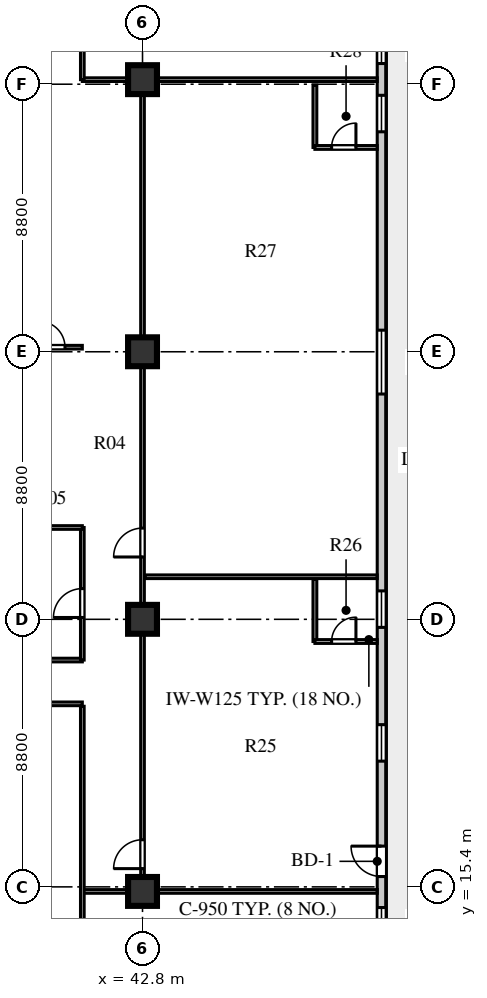
"""IFC4 building model, lengths in metres.
Left out: names, types, materials, properties, quantities, classifications, styles, units other than length and angle.
Written with IfcOpenShell. Run it as: python <this file> out.ifc"""

import sys

from ifc_helpers import new_model, si_unit, direction, frame, frame_2d, origin, origin_2d, place, context, subcontext, project, spatial, rectangle, extrude, element, fill, save


model = new_model("IFC4")
c1 = context("Model", 3, precision=1e-05, world=origin(), true_north=direction((0.0, 1.0)))
c2 = subcontext(c1, "Body", "Model", "MODEL_VIEW")
j1 = project(units=[si_unit("LENGTHUNIT", "METRE"), si_unit("PLANEANGLEUNIT", "RADIAN")], contexts=[c1])
p1 = place(None, origin())
s1 = spatial("IfcSite", under=j1, at=p1, CompositionType="ELEMENT")
p2 = place(p1, origin())
s2 = spatial("IfcBuilding", under=s1, at=p2, CompositionType="ELEMENT")
p3 = place(p2, frame((0.0, 0.0, 181.0)))
s3 = spatial("IfcBuildingStorey", under=s2, at=p3, CompositionType="ELEMENT", Elevation=181.0)
for number, where, z_axis, x_axis in (
    (1, (42.8, 15.25, 0.0), (0.0, 0.0, 1.0), (1.0, 0.0, 0.0)),
    (2, (42.8, 24.2, 0.0), (0.0, 0.0, 1.0), (1.0, 0.0, 0.0)),
    (3, (42.8, 33.0, 0.0), (0.0, 0.0, 1.0), (1.0, 0.0, 0.0)),
    (4, (42.8, 41.95, 0.0), (0.0, 0.0, 1.0), (1.0, 0.0, 0.0)),
):
    element("IfcColumn", number, at=place(p3, frame(where, z_axis=z_axis, x_axis=x_axis)), inside=s3, PredefinedType="COLUMN", context=c2, shape_type="SweptSolid", body=[
        extrude(rectangle(XDim=0.95, YDim=0.95, at=origin_2d()), origin(), (0.0, 0.0, 1.0), 3.6),
    ])
p4 = place(p3, frame((50.66, 13.13, 0.0), z_axis=(0.0, 0.0, 1.0), x_axis=(0.0, 1.0, 0.0)))
e5 = element("IfcWall", 5, at=p4, inside=s3, PredefinedType="STANDARD", context=c2, shape_type="SweptSolid", body=[
    extrude(rectangle(XDim=30.94, YDim=0.28, at=frame_2d((15.47, 0.0))), origin(), (0.0, 0.0, 1.0), 3.6),
])
p5 = place(p4, frame((0.64, 0.0, 0.8)))
e6 = element("IfcOpeningElement", 6, at=p5, cuts=e5, PredefinedType="OPENING", context=c2, shape_type="SweptSolid", body=[
    extrude(rectangle(XDim=0.95, YDim=1.65, at=frame_2d((0.475, 0.825))), frame((0.0, 0.15, 0.0), z_axis=(0.0, -1.0, 0.0), x_axis=(1.0, 0.0, 0.0)), (0.0, 0.0, 1.0), 0.3),
])
p6 = place(p4, frame((2.61, 0.0, 0.0)))
e7 = element("IfcOpeningElement", 7, at=p6, cuts=e5, PredefinedType="OPENING", context=c2, shape_type="SweptSolid", body=[
    extrude(rectangle(XDim=1.0, YDim=2.05, at=frame_2d((0.5, 1.025))), frame((0.0, 0.15, 0.0), z_axis=(0.0, -1.0, 0.0), x_axis=(1.0, 0.0, 0.0)), (0.0, 0.0, 1.0), 0.3),
])
p7 = place(p4, frame((6.405, 0.0, 0.8)))
e8 = element("IfcOpeningElement", 8, at=p7, cuts=e5, PredefinedType="OPENING", context=c2, shape_type="SweptSolid", body=[
    extrude(rectangle(XDim=1.2, YDim=1.75, at=frame_2d((0.6, 0.875))), frame((0.0, 0.15, 0.0), z_axis=(0.0, -1.0, 0.0), x_axis=(1.0, 0.0, 0.0)), (0.0, 0.0, 1.0), 0.3),
])
p8 = place(p4, frame((10.805, 0.0, 0.8)))
e9 = element("IfcOpeningElement", 9, at=p8, cuts=e5, PredefinedType="OPENING", context=c2, shape_type="SweptSolid", body=[
    extrude(rectangle(XDim=1.2, YDim=1.75, at=frame_2d((0.6, 0.875))), frame((0.0, 0.15, 0.0), z_axis=(0.0, -1.0, 0.0), x_axis=(1.0, 0.0, 0.0)), (0.0, 0.0, 1.0), 0.3),
])
p9 = place(p4, frame((18.48, 0.0, 0.8)))
e10 = element("IfcOpeningElement", 10, at=p9, cuts=e5, PredefinedType="OPENING", context=c2, shape_type="SweptSolid", body=[
    extrude(rectangle(XDim=2.1, YDim=1.95, at=frame_2d((1.05, 0.975))), frame((0.0, 0.15, 0.0), z_axis=(0.0, -1.0, 0.0), x_axis=(1.0, 0.0, 0.0)), (0.0, 0.0, 1.0), 0.3),
])
p10 = place(p4, frame((27.105, 0.0, 0.8)))
e11 = element("IfcOpeningElement", 11, at=p10, cuts=e5, PredefinedType="OPENING", context=c2, shape_type="SweptSolid", body=[
    extrude(rectangle(XDim=1.2, YDim=1.75, at=frame_2d((0.6, 0.875))), frame((0.0, 0.15, 0.0), z_axis=(0.0, -1.0, 0.0), x_axis=(1.0, 0.0, 0.0)), (0.0, 0.0, 1.0), 0.3),
])
p11 = place(p4, frame((29.35, 0.0, 0.8)))
e12 = element("IfcOpeningElement", 12, at=p11, cuts=e5, PredefinedType="OPENING", context=c2, shape_type="SweptSolid", body=[
    extrude(rectangle(XDim=0.95, YDim=1.65, at=frame_2d((0.475, 0.825))), frame((0.0, 0.15, 0.0), z_axis=(0.0, -1.0, 0.0), x_axis=(1.0, 0.0, 0.0)), (0.0, 0.0, 1.0), 0.3),
])
p12 = place(p3, frame((25.22, 21.42, 0.0), z_axis=(0.0, 0.0, 1.0), x_axis=(1.0, 0.0, 0.0)))
e13 = element("IfcWall", 13, at=p12, inside=s3, PredefinedType="PARTITIONING", context=c2, shape_type="SweptSolid", body=[
    extrude(rectangle(XDim=15.6, YDim=0.12, at=frame_2d((7.8, 0.0))), origin(), (0.0, 0.0, 1.0), 3.25),
])
p13 = place(p12, frame((0.73, 0.0, 0.0)))
e14 = element("IfcOpeningElement", 14, at=p13, cuts=e13, PredefinedType="OPENING", context=c2, shape_type="SweptSolid", body=[
    extrude(rectangle(XDim=0.95, YDim=2.1, at=frame_2d((0.475, 1.05))), frame((0.0, 0.07, 0.0), z_axis=(0.0, -1.0, 0.0), x_axis=(1.0, 0.0, 0.0)), (0.0, 0.0, 1.0), 0.14),
])
p14 = place(p12, frame((4.83, 0.0, 0.0)))
e15 = element("IfcOpeningElement", 15, at=p14, cuts=e13, PredefinedType="OPENING", context=c2, shape_type="SweptSolid", body=[
    extrude(rectangle(XDim=0.95, YDim=2.1, at=frame_2d((0.475, 1.05))), frame((0.0, 0.07, 0.0), z_axis=(0.0, -1.0, 0.0), x_axis=(1.0, 0.0, 0.0)), (0.0, 0.0, 1.0), 0.14),
])
p15 = place(p12, frame((10.23, 0.0, 0.0)))
e16 = element("IfcOpeningElement", 16, at=p15, cuts=e13, PredefinedType="OPENING", context=c2, shape_type="SweptSolid", body=[
    extrude(rectangle(XDim=0.95, YDim=2.1, at=frame_2d((0.475, 1.05))), frame((0.0, 0.07, 0.0), z_axis=(0.0, -1.0, 0.0), x_axis=(1.0, 0.0, 0.0)), (0.0, 0.0, 1.0), 0.14),
])
p16 = place(p3, frame((27.15, 22.86, 0.0), z_axis=(0.0, 0.0, 1.0), x_axis=(1.0, 0.0, 0.0)))
e17 = element("IfcWall", 17, at=p16, inside=s3, PredefinedType="PARTITIONING", context=c2, shape_type="SweptSolid", body=[
    extrude(rectangle(XDim=13.67, YDim=0.12, at=frame_2d((6.835, 0.0))), origin(), (0.0, 0.0, 1.0), 3.6),
])
p17 = place(p16, frame((2.2, 0.0, 0.0)))
e18 = element("IfcOpeningElement", 18, at=p17, cuts=e17, PredefinedType="OPENING", context=c2, shape_type="SweptSolid", body=[
    extrude(rectangle(XDim=0.9, YDim=2.08, at=frame_2d((0.45, 1.04))), frame((0.0, 0.07, 0.0), z_axis=(0.0, -1.0, 0.0), x_axis=(1.0, 0.0, 0.0)), (0.0, 0.0, 1.0), 0.14),
])
p18 = place(p3, frame((42.8, 15.25, 0.0), z_axis=(0.0, 0.0, 1.0), x_axis=(0.0, 1.0, 0.0)))
e19 = element("IfcWall", 19, at=p18, inside=s3, PredefinedType="PARTITIONING", context=c2, shape_type="SweptSolid", body=[
    extrude(rectangle(XDim=26.7, YDim=0.12, at=frame_2d((13.35, 0.0))), origin(), (0.0, 0.0, 1.0), 2.95),
])
p19 = place(p18, frame((0.75, 0.0, 0.0)))
e20 = element("IfcOpeningElement", 20, at=p19, cuts=e19, PredefinedType="OPENING", context=c2, shape_type="SweptSolid", body=[
    extrude(rectangle(XDim=0.95, YDim=2.1, at=frame_2d((0.475, 1.05))), frame((0.0, 0.07, 0.0), z_axis=(0.0, -1.0, 0.0), x_axis=(1.0, 0.0, 0.0)), (0.0, 0.0, 1.0), 0.14),
])
p20 = place(p18, frame((11.0, 0.0, 0.0)))
e21 = element("IfcOpeningElement", 21, at=p20, cuts=e19, PredefinedType="OPENING", context=c2, shape_type="SweptSolid", body=[
    extrude(rectangle(XDim=0.95, YDim=2.1, at=frame_2d((0.475, 1.05))), frame((0.0, 0.07, 0.0), z_axis=(0.0, -1.0, 0.0), x_axis=(1.0, 0.0, 0.0)), (0.0, 0.0, 1.0), 0.14),
])
for number, where, z_axis, x_axis in (
    (22, (40.82, 15.25, 0.0), (0.0, 0.0, 1.0), (1.0, 0.0, 0.0)),
    (23, (40.82, 41.95, 0.0), (0.0, 0.0, 1.0), (1.0, 0.0, 0.0)),
):
    element("IfcWall", number, at=place(p3, frame(where, z_axis=z_axis, x_axis=x_axis)), inside=s3, PredefinedType="PARTITIONING", context=c2, shape_type="SweptSolid", body=[
        extrude(rectangle(XDim=9.7, YDim=0.12, at=frame_2d((4.85, 0.0))), origin(), (0.0, 0.0, 1.0), 2.95),
    ])
p21 = place(p3, frame((40.82, 22.86, 0.0), z_axis=(0.0, 0.0, 1.0), x_axis=(0.0, 1.0, 0.0)))
e24 = element("IfcWall", 24, at=p21, inside=s3, PredefinedType="PARTITIONING", context=c2, shape_type="SweptSolid", body=[
    extrude(rectangle(XDim=4.36, YDim=0.12, at=frame_2d((2.18, 0.0))), origin(), (0.0, 0.0, 1.0), 3.6),
])
p22 = place(p21, frame((1.4, 0.0, 0.0)))
e25 = element("IfcOpeningElement", 25, at=p22, cuts=e24, PredefinedType="OPENING", context=c2, shape_type="SweptSolid", body=[
    extrude(rectangle(XDim=0.95, YDim=2.1, at=frame_2d((0.475, 1.05))), frame((0.0, 0.07, 0.0), z_axis=(0.0, -1.0, 0.0), x_axis=(1.0, 0.0, 0.0)), (0.0, 0.0, 1.0), 0.14),
])
p23 = place(p3, frame((36.9, 27.22, 0.0), z_axis=(0.0, 0.0, 1.0), x_axis=(1.0, 0.0, 0.0)))
e26 = element("IfcWall", 26, at=p23, inside=s3, PredefinedType="PARTITIONING", context=c2, shape_type="SweptSolid", body=[
    extrude(rectangle(XDim=3.92, YDim=0.12, at=frame_2d((1.96, 0.0))), origin(), (0.0, 0.0, 1.0), 3.25),
])
p24 = place(p3, frame((40.82, 7.88, 0.0), z_axis=(0.0, 0.0, 1.0), x_axis=(0.0, 1.0, 0.0)))
e27 = element("IfcWall", 27, at=p24, inside=s3, PredefinedType="PARTITIONING", context=c2, shape_type="SweptSolid", body=[
    extrude(rectangle(XDim=13.46, YDim=0.12, at=frame_2d((6.73, 0.0))), origin(), (0.0, 0.0, 1.0), 3.6),
])
p25 = place(p3, frame((48.47, 23.47, 0.0), z_axis=(0.0, 0.0, 1.0), x_axis=(0.0, 1.0, 0.0)))
e28 = element("IfcWall", 28, at=p25, inside=s3, PredefinedType="PLUMBINGWALL", context=c2, shape_type="SweptSolid", body=[
    extrude(rectangle(XDim=2.05, YDim=0.125, at=frame_2d((1.025, 0.0))), origin(), (0.0, 0.0, 1.0), 3.6),
])
p26 = place(p3, frame((48.47, 23.47, 0.0), z_axis=(0.0, 0.0, 1.0), x_axis=(1.0, 0.0, 0.0)))
e29 = element("IfcWall", 29, at=p26, inside=s3, PredefinedType="PLUMBINGWALL", context=c2, shape_type="SweptSolid", body=[
    extrude(rectangle(XDim=2.05, YDim=0.125, at=frame_2d((1.025, 0.0))), origin(), (0.0, 0.0, 1.0), 3.6),
])
p27 = place(p26, frame((0.55, 0.0, 0.0)))
e30 = element("IfcOpeningElement", 30, at=p27, cuts=e29, PredefinedType="OPENING", context=c2, shape_type="SweptSolid", body=[
    extrude(rectangle(XDim=0.8, YDim=2.05, at=frame_2d((0.4, 1.025))), frame((0.0, 0.073, 0.0), z_axis=(0.0, -1.0, 0.0), x_axis=(1.0, 0.0, 0.0)), (0.0, 0.0, 1.0), 0.145),
])
p28 = place(p3, frame((42.88, 25.6, 0.0), z_axis=(0.0, 0.0, 1.0), x_axis=(1.0, 0.0, 0.0)))
e31 = element("IfcWall", 31, at=p28, inside=s3, PredefinedType="PARTITIONING", context=c2, shape_type="SweptSolid", body=[
    extrude(rectangle(XDim=7.64, YDim=0.12, at=frame_2d((3.82, 0.0))), origin(), (0.0, 0.0, 1.0), 3.6),
])
p29 = place(p3, frame((48.47, 39.72, 0.0), z_axis=(0.0, 0.0, 1.0), x_axis=(0.0, 1.0, 0.0)))
e32 = element("IfcWall", 32, at=p29, inside=s3, PredefinedType="PLUMBINGWALL", context=c2, shape_type="SweptSolid", body=[
    extrude(rectangle(XDim=2.05, YDim=0.125, at=frame_2d((1.025, 0.0))), origin(), (0.0, 0.0, 1.0), 3.6),
])
p30 = place(p3, frame((48.47, 39.72, 0.0), z_axis=(0.0, 0.0, 1.0), x_axis=(1.0, 0.0, 0.0)))
e33 = element("IfcWall", 33, at=p30, inside=s3, PredefinedType="PLUMBINGWALL", context=c2, shape_type="SweptSolid", body=[
    extrude(rectangle(XDim=2.05, YDim=0.125, at=frame_2d((1.025, 0.0))), origin(), (0.0, 0.0, 1.0), 3.6),
])
p31 = place(p30, frame((0.55, 0.0, 0.0)))
e34 = element("IfcOpeningElement", 34, at=p31, cuts=e33, PredefinedType="OPENING", context=c2, shape_type="SweptSolid", body=[
    extrude(rectangle(XDim=0.8, YDim=2.05, at=frame_2d((0.4, 1.025))), frame((0.0, 0.073, 0.0), z_axis=(0.0, -1.0, 0.0), x_axis=(1.0, 0.0, 0.0)), (0.0, 0.0, 1.0), 0.145),
])
p32 = place(p3, frame((38.95, 33.15, 0.0), z_axis=(0.0, 0.0, 1.0), x_axis=(1.0, 0.0, 0.0)))
e35 = element("IfcWall", 35, at=p32, inside=s3, PredefinedType="PARTITIONING", context=c2, shape_type="SweptSolid", body=[
    extrude(rectangle(XDim=1.87, YDim=0.12, at=frame_2d((0.935, 0.0))), origin(), (0.0, 0.0, 1.0), 3.6),
])
p33 = place(p32, frame((0.45, 0.0, 0.0)))
e36 = element("IfcOpeningElement", 36, at=p33, cuts=e35, PredefinedType="OPENING", context=c2, shape_type="SweptSolid", body=[
    extrude(rectangle(XDim=0.85, YDim=2.05, at=frame_2d((0.425, 1.025))), frame((0.0, 0.07, 0.0), z_axis=(0.0, -1.0, 0.0), x_axis=(1.0, 0.0, 0.0)), (0.0, 0.0, 1.0), 0.14),
])
p34 = place(p3, frame((40.82, 41.95, 0.0), z_axis=(0.0, 0.0, 1.0), x_axis=(0.0, 1.0, 0.0)))
e37 = element("IfcWall", 37, at=p34, inside=s3, PredefinedType="PARTITIONING", context=c2, shape_type="SweptSolid", body=[
    extrude(rectangle(XDim=7.37, YDim=0.12, at=frame_2d((3.685, 0.0))), origin(), (0.0, 0.0, 1.0), 3.6),
])
p35 = place(p5, origin())
e38 = element("IfcWindow", 38, at=p35, inside=s3, PartitioningType="SINGLE_PANEL", PredefinedType="WINDOW", context=c2, shape_type="SweptSolid", body=[
    extrude(rectangle(XDim=0.95, YDim=1.65, at=frame_2d((0.475, 0.825))), frame((0.0, 0.03, 0.0), z_axis=(0.0, -1.0, 0.0), x_axis=(1.0, 0.0, 0.0)), (0.0, 0.0, 1.0), 0.06),
])
fill(e6, e38)
p36 = place(p6, frame((1.0, 0.0, 0.0), z_axis=(0.0, 0.0, 1.0), x_axis=(-1.0, 0.0, 0.0)))
e39 = element("IfcDoor", 39, at=p36, inside=s3, OperationType="SINGLE_SWING_LEFT", PredefinedType="DOOR", context=c2, shape_type="SweptSolid", body=[
    extrude(rectangle(XDim=1.0, YDim=2.05, at=frame_2d((0.5, 1.025))), frame((0.0, 0.025, 0.0), z_axis=(0.0, -1.0, 0.0), x_axis=(1.0, 0.0, 0.0)), (0.0, 0.0, 1.0), 0.05),
])
fill(e7, e39)
p37 = place(p7, origin())
e40 = element("IfcWindow", 40, at=p37, inside=s3, PartitioningType="SINGLE_PANEL", PredefinedType="WINDOW", context=c2, shape_type="SweptSolid", body=[
    extrude(rectangle(XDim=1.2, YDim=1.75, at=frame_2d((0.6, 0.875))), frame((0.0, 0.03, 0.0), z_axis=(0.0, -1.0, 0.0), x_axis=(1.0, 0.0, 0.0)), (0.0, 0.0, 1.0), 0.06),
])
fill(e8, e40)
p38 = place(p8, origin())
e41 = element("IfcWindow", 41, at=p38, inside=s3, PartitioningType="SINGLE_PANEL", PredefinedType="WINDOW", context=c2, shape_type="SweptSolid", body=[
    extrude(rectangle(XDim=1.2, YDim=1.75, at=frame_2d((0.6, 0.875))), frame((0.0, 0.03, 0.0), z_axis=(0.0, -1.0, 0.0), x_axis=(1.0, 0.0, 0.0)), (0.0, 0.0, 1.0), 0.06),
])
fill(e9, e41)
p39 = place(p9, origin())
e42 = element("IfcWindow", 42, at=p39, inside=s3, PartitioningType="SINGLE_PANEL", PredefinedType="WINDOW", context=c2, shape_type="SweptSolid", body=[
    extrude(rectangle(XDim=2.1, YDim=1.95, at=frame_2d((1.05, 0.975))), frame((0.0, 0.03, 0.0), z_axis=(0.0, -1.0, 0.0), x_axis=(1.0, 0.0, 0.0)), (0.0, 0.0, 1.0), 0.06),
])
fill(e10, e42)
p40 = place(p10, origin())
e43 = element("IfcWindow", 43, at=p40, inside=s3, PartitioningType="SINGLE_PANEL", PredefinedType="WINDOW", context=c2, shape_type="SweptSolid", body=[
    extrude(rectangle(XDim=1.2, YDim=1.75, at=frame_2d((0.6, 0.875))), frame((0.0, 0.03, 0.0), z_axis=(0.0, -1.0, 0.0), x_axis=(1.0, 0.0, 0.0)), (0.0, 0.0, 1.0), 0.06),
])
fill(e11, e43)
p41 = place(p11, origin())
e44 = element("IfcWindow", 44, at=p41, inside=s3, PartitioningType="SINGLE_PANEL", PredefinedType="WINDOW", context=c2, shape_type="SweptSolid", body=[
    extrude(rectangle(XDim=0.95, YDim=1.65, at=frame_2d((0.475, 0.825))), frame((0.0, 0.03, 0.0), z_axis=(0.0, -1.0, 0.0), x_axis=(1.0, 0.0, 0.0)), (0.0, 0.0, 1.0), 0.06),
])
fill(e12, e44)
p42 = place(p22, frame((0.95, 0.0, 0.0), z_axis=(0.0, 0.0, 1.0), x_axis=(-1.0, 0.0, 0.0)))
e45 = element("IfcDoor", 45, at=p42, inside=s3, OperationType="SINGLE_SWING_RIGHT", PredefinedType="DOOR", context=c2, shape_type="SweptSolid", body=[
    extrude(rectangle(XDim=0.95, YDim=2.1, at=frame_2d((0.475, 1.05))), frame((0.0, 0.025, 0.0), z_axis=(0.0, -1.0, 0.0), x_axis=(1.0, 0.0, 0.0)), (0.0, 0.0, 1.0), 0.05),
])
fill(e25, e45)
p43 = place(p19, origin())
e46 = element("IfcDoor", 46, at=p43, inside=s3, OperationType="SINGLE_SWING_LEFT", PredefinedType="DOOR", context=c2, shape_type="SweptSolid", body=[
    extrude(rectangle(XDim=0.95, YDim=2.1, at=frame_2d((0.475, 1.05))), frame((0.0, 0.025, 0.0), z_axis=(0.0, -1.0, 0.0), x_axis=(1.0, 0.0, 0.0)), (0.0, 0.0, 1.0), 0.05),
])
fill(e20, e46)
p44 = place(p27, frame((0.8, 0.0, 0.0), z_axis=(0.0, 0.0, 1.0), x_axis=(-1.0, 0.0, 0.0)))
e47 = element("IfcDoor", 47, at=p44, inside=s3, OperationType="SINGLE_SWING_LEFT", PredefinedType="DOOR", context=c2, shape_type="SweptSolid", body=[
    extrude(rectangle(XDim=0.8, YDim=2.05, at=frame_2d((0.4, 1.025))), frame((0.0, 0.025, 0.0), z_axis=(0.0, -1.0, 0.0), x_axis=(1.0, 0.0, 0.0)), (0.0, 0.0, 1.0), 0.05),
])
fill(e30, e47)
p45 = place(p20, origin())
e48 = element("IfcDoor", 48, at=p45, inside=s3, OperationType="SINGLE_SWING_LEFT", PredefinedType="DOOR", context=c2, shape_type="SweptSolid", body=[
    extrude(rectangle(XDim=0.95, YDim=2.1, at=frame_2d((0.475, 1.05))), frame((0.0, 0.025, 0.0), z_axis=(0.0, -1.0, 0.0), x_axis=(1.0, 0.0, 0.0)), (0.0, 0.0, 1.0), 0.05),
])
fill(e21, e48)
p46 = place(p31, frame((0.8, 0.0, 0.0), z_axis=(0.0, 0.0, 1.0), x_axis=(-1.0, 0.0, 0.0)))
e49 = element("IfcDoor", 49, at=p46, inside=s3, OperationType="SINGLE_SWING_LEFT", PredefinedType="DOOR", context=c2, shape_type="SweptSolid", body=[
    extrude(rectangle(XDim=0.8, YDim=2.05, at=frame_2d((0.4, 1.025))), frame((0.0, 0.025, 0.0), z_axis=(0.0, -1.0, 0.0), x_axis=(1.0, 0.0, 0.0)), (0.0, 0.0, 1.0), 0.05),
])
fill(e34, e49)
p47 = place(p33, origin())
e50 = element("IfcDoor", 50, at=p47, inside=s3, OperationType="SINGLE_SWING_LEFT", PredefinedType="DOOR", context=c2, shape_type="SweptSolid", body=[
    extrude(rectangle(XDim=0.85, YDim=2.05, at=frame_2d((0.425, 1.025))), frame((0.0, 0.025, 0.0), z_axis=(0.0, -1.0, 0.0), x_axis=(1.0, 0.0, 0.0)), (0.0, 0.0, 1.0), 0.05),
])
fill(e36, e50)
save(model, sys.argv[1])
